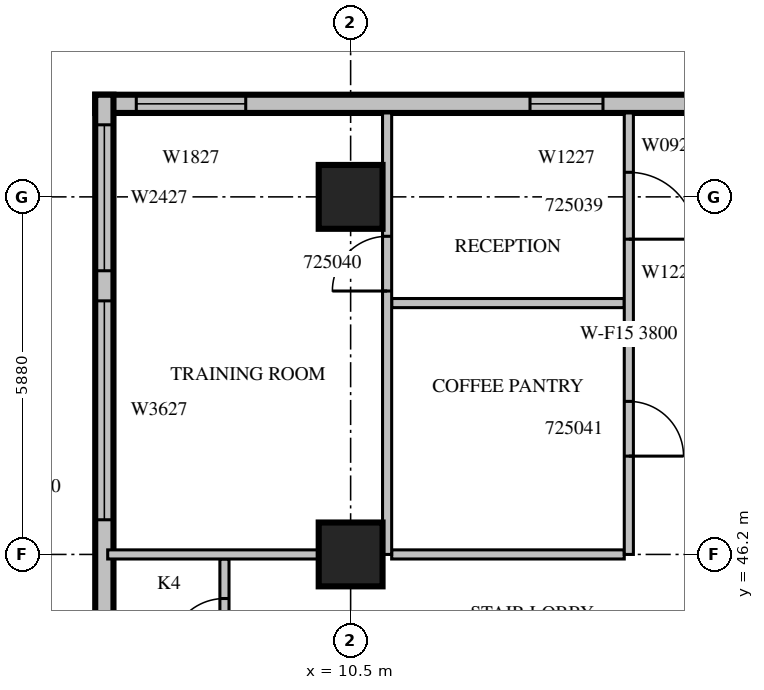
"""IFC4 building model, lengths in metres.
Left out: names, types, materials, properties, quantities, classifications, styles, units other than length and angle.
Written with IfcOpenShell. Run it as: python <this file> out.ifc"""

import sys

from ifc_helpers import new_model, si_unit, direction, frame, frame_2d, origin, origin_2d, place, context, subcontext, project, spatial, rectangle, extrude, source, transform, mapped, element, fill, save


model = new_model("IFC4")
c1 = context("Model", 3, precision=1e-05, world=origin(), true_north=direction((0.0, 1.0)))
c2 = subcontext(c1, "Body", "Model", "MODEL_VIEW")
j1 = project(units=[si_unit("LENGTHUNIT", "METRE"), si_unit("PLANEANGLEUNIT", "RADIAN")], contexts=[c1])
p1 = place(None, origin())
s1 = spatial("IfcSite", under=j1, at=p1, CompositionType="ELEMENT")
p2 = place(p1, origin())
s2 = spatial("IfcBuilding", under=s1, at=p2, CompositionType="ELEMENT")
p3 = place(p2, frame((0.0, 0.0, 116.1)))
s3 = spatial("IfcBuildingStorey", under=s2, at=p3, CompositionType="ELEMENT", Elevation=116.1)
m1 = source(origin(), c2, "Body", "SweptSolid", [
    extrude(rectangle(XDim=1.05, YDim=1.05, at=origin_2d()), origin(), (0.0, 0.0, 1.0), 4.2),
])
for number, where, z_axis, x_axis in (
    (1, (10.5, 46.2, 0.0), (0.0, 0.0, 1.0), (1.0, 0.0, 0.0)),
    (2, (10.5, 52.08, 0.0), (0.0, 0.0, 1.0), (1.0, 0.0, 0.0)),
):
    element("IfcColumn", number, at=place(p3, frame(where, z_axis=z_axis, x_axis=x_axis)), inside=s3, PredefinedType="COLUMN", context=c2, shape_type="MappedRepresentation", body=[
        mapped(m1, transform((0.0, 0.0, 0.0), scale=1.0)),
    ])
m2 = source(origin(), c2, "Body", "SweptSolid", [
    extrude(rectangle(XDim=10.5, YDim=0.3, at=frame_2d((5.25, 0.0))), origin(), (0.0, 0.0, 1.0), 3.8),
])
p4 = place(p3, frame((16.8, 53.61, 0.0), z_axis=(0.0, 0.0, 1.0), x_axis=(-1.0, 0.0, 0.0)))
e3 = element("IfcWall", 3, at=p4, inside=s3, PredefinedType="STANDARD", context=c2, shape_type="MappedRepresentation", body=[
    mapped(m2, transform((0.0, 0.0, 0.0), scale=1.0)),
])
m3 = source(origin(), c2, "Body", "SweptSolid", [
    extrude(rectangle(XDim=1.2, YDim=2.7, at=frame_2d((0.6, 1.35))), frame((0.0, 0.16, 0.0), z_axis=(0.0, -1.0, 0.0), x_axis=(1.0, 0.0, 0.0)), (0.0, 0.0, 1.0), 0.32),
])
p5 = place(p4, frame((2.15, 0.0, 0.6)))
e4 = element("IfcOpeningElement", 4, at=p5, cuts=e3, PredefinedType="OPENING", context=c2, shape_type="MappedRepresentation", body=[
    mapped(m3, transform((0.0, 0.0, 0.0), scale=1.0)),
])
m4 = source(origin(), c2, "Body", "SweptSolid", [
    extrude(rectangle(XDim=1.8, YDim=2.7, at=frame_2d((0.9, 1.35))), frame((0.0, 0.16, 0.0), z_axis=(0.0, -1.0, 0.0), x_axis=(1.0, 0.0, 0.0)), (0.0, 0.0, 1.0), 0.32),
])
p6 = place(p4, frame((8.025, 0.0, 0.6)))
e5 = element("IfcOpeningElement", 5, at=p6, cuts=e3, PredefinedType="OPENING", context=c2, shape_type="MappedRepresentation", body=[
    mapped(m4, transform((0.0, 0.0, 0.0), scale=1.0)),
])
m5 = source(origin(), c2, "Body", "SweptSolid", [
    extrude(rectangle(XDim=9.91, YDim=0.3, at=frame_2d((4.955, 0.0))), origin(), (0.0, 0.0, 1.0), 3.8),
])
p7 = place(p3, frame((6.45, 53.76, 0.0), z_axis=(0.0, 0.0, 1.0), x_axis=(0.0, -1.0, 0.0)))
e6 = element("IfcWall", 6, at=p7, inside=s3, PredefinedType="STANDARD", context=c2, shape_type="MappedRepresentation", body=[
    mapped(m5, transform((0.0, 0.0, 0.0), scale=1.0)),
])
m6 = source(origin(), c2, "Body", "SweptSolid", [
    extrude(rectangle(XDim=3.6, YDim=2.7, at=frame_2d((1.8, 1.35))), frame((0.0, 0.16, 0.0), z_axis=(0.0, -1.0, 0.0), x_axis=(1.0, 0.0, 0.0)), (0.0, 0.0, 1.0), 0.32),
])
p8 = place(p7, frame((3.39, 0.0, 0.6)))
e7 = element("IfcOpeningElement", 7, at=p8, cuts=e6, PredefinedType="OPENING", context=c2, shape_type="MappedRepresentation", body=[
    mapped(m6, transform((0.0, 0.0, 0.0), scale=1.0)),
])
m7 = source(origin(), c2, "Body", "SweptSolid", [
    extrude(rectangle(XDim=2.4, YDim=2.7, at=frame_2d((1.2, 1.35))), frame((0.0, 0.16, 0.0), z_axis=(0.0, -1.0, 0.0), x_axis=(1.0, 0.0, 0.0)), (0.0, 0.0, 1.0), 0.32),
])
p9 = place(p7, frame((0.495, 0.0, 0.6)))
e8 = element("IfcOpeningElement", 8, at=p9, cuts=e6, PredefinedType="OPENING", context=c2, shape_type="MappedRepresentation", body=[
    mapped(m7, transform((0.0, 0.0, 0.0), scale=1.0)),
])
m8 = source(origin(), c2, "Body", "SweptSolid", [
    extrude(rectangle(XDim=2.2, YDim=0.15, at=frame_2d((1.1, 0.0))), origin(), (0.0, 0.0, 1.0), 3.8),
])
p10 = place(p3, frame((8.425, 43.925, 0.0), z_axis=(0.0, 0.0, 1.0), x_axis=(0.0, 1.0, 0.0)))
e9 = element("IfcWall", 9, at=p10, inside=s3, PredefinedType="PARTITIONING", context=c2, shape_type="MappedRepresentation", body=[
    mapped(m8, transform((0.0, 0.0, 0.0), scale=1.0)),
])
m9 = source(origin(), c2, "Body", "SweptSolid", [
    extrude(rectangle(XDim=0.9, YDim=2.1, at=frame_2d((0.45, 1.05))), frame((0.0, 0.085, 0.0), z_axis=(0.0, -1.0, 0.0), x_axis=(1.0, 0.0, 0.0)), (0.0, 0.0, 1.0), 0.17),
])
p11 = place(p10, frame((0.65, 0.0, 0.0)))
e10 = element("IfcOpeningElement", 10, at=p11, cuts=e9, PredefinedType="OPENING", context=c2, shape_type="MappedRepresentation", body=[
    mapped(m9, transform((0.0, 0.0, 0.0), scale=1.0)),
])
m10 = source(origin(), c2, "Body", "SweptSolid", [
    extrude(rectangle(XDim=3.825, YDim=0.15, at=frame_2d((1.913, 0.0))), origin(), (0.0, 0.0, 1.0), 3.8),
])
p12 = place(p3, frame((15.0, 50.334, 0.0), z_axis=(0.0, 0.0, 1.0), x_axis=(-1.0, 0.0, 0.0)))
e11 = element("IfcWall", 11, at=p12, inside=s3, PredefinedType="PARTITIONING", context=c2, shape_type="MappedRepresentation", body=[
    mapped(m10, transform((0.0, 0.0, 0.0), scale=1.0)),
])
m11 = source(origin(), c2, "Body", "SweptSolid", [
    extrude(rectangle(XDim=3.471, YDim=0.15, at=frame_2d((1.736, 0.0))), origin(), (0.0, 0.0, 1.0), 3.8),
])
p13 = place(p3, frame((9.976, 46.2, 0.0), z_axis=(0.0, 0.0, 1.0), x_axis=(-1.0, 0.0, 0.0)))
e12 = element("IfcWall", 12, at=p13, inside=s3, PredefinedType="PARTITIONING", context=c2, shape_type="MappedRepresentation", body=[
    mapped(m11, transform((0.0, 0.0, 0.0), scale=1.0)),
])
p14 = place(p3, frame((15.0, 46.2, 0.0), z_axis=(0.0, 0.0, 1.0), x_axis=(-1.0, 0.0, 0.0)))
e13 = element("IfcWall", 13, at=p14, inside=s3, PredefinedType="PARTITIONING", context=c2, shape_type="MappedRepresentation", body=[
    mapped(m10, transform((0.0, 0.0, 0.0), scale=1.0)),
])
m12 = source(origin(), c2, "Body", "SweptSolid", [
    extrude(rectangle(XDim=7.26, YDim=0.15, at=frame_2d((3.63, 0.0))), origin(), (0.0, 0.0, 1.0), 3.8),
])
p15 = place(p3, frame((11.1, 46.2, 0.0), z_axis=(0.0, 0.0, 1.0), x_axis=(0.0, 1.0, 0.0)))
e14 = element("IfcWall", 14, at=p15, inside=s3, PredefinedType="PARTITIONING", context=c2, shape_type="MappedRepresentation", body=[
    mapped(m12, transform((0.0, 0.0, 0.0), scale=1.0)),
])
p16 = place(p15, frame((4.332, 0.0, 0.0)))
e15 = element("IfcOpeningElement", 15, at=p16, cuts=e14, PredefinedType="OPENING", context=c2, shape_type="MappedRepresentation", body=[
    mapped(m9, transform((0.0, 0.0, 0.0), scale=1.0)),
])
p17 = place(p3, frame((15.075, 46.2, 0.0), z_axis=(0.0, 0.0, 1.0), x_axis=(0.0, 1.0, 0.0)))
e16 = element("IfcWall", 16, at=p17, inside=s3, PredefinedType="PARTITIONING", context=c2, shape_type="MappedRepresentation", body=[
    mapped(m12, transform((0.0, 0.0, 0.0), scale=1.0)),
])
m13 = source(origin(), c2, "Body", "SweptSolid", [
    extrude(rectangle(XDim=1.1, YDim=2.1, at=frame_2d((0.55, 1.05))), frame((0.0, 0.085, 0.0), z_axis=(0.0, -1.0, 0.0), x_axis=(1.0, 0.0, 0.0)), (0.0, 0.0, 1.0), 0.17),
])
p18 = place(p17, frame((5.184, 0.0, 0.0)))
e17 = element("IfcOpeningElement", 17, at=p18, cuts=e16, PredefinedType="OPENING", context=c2, shape_type="MappedRepresentation", body=[
    mapped(m13, transform((0.0, 0.0, 0.0), scale=1.0)),
])
p19 = place(p17, frame((1.617, 0.0, 0.0)))
e18 = element("IfcOpeningElement", 18, at=p19, cuts=e16, PredefinedType="OPENING", context=c2, shape_type="MappedRepresentation", body=[
    mapped(m9, transform((0.0, 0.0, 0.0), scale=1.0)),
])
m14 = source(origin(), c2, "Body", "SweptSolid", [
    extrude(rectangle(XDim=1.2, YDim=2.7, at=frame_2d((0.6, 1.35))), frame((0.0, 0.03, 0.0), z_axis=(0.0, -1.0, 0.0), x_axis=(1.0, 0.0, 0.0)), (0.0, 0.0, 1.0), 0.06),
])
p20 = place(p5, origin())
e19 = element("IfcWindow", 19, at=p20, inside=s3, PartitioningType="SINGLE_PANEL", PredefinedType="WINDOW", context=c2, shape_type="MappedRepresentation", body=[
    mapped(m14, transform((0.0, 0.0, 0.0), scale=1.0)),
])
fill(e4, e19)
m15 = source(origin(), c2, "Body", "SweptSolid", [
    extrude(rectangle(XDim=1.8, YDim=2.7, at=frame_2d((0.9, 1.35))), frame((0.0, 0.03, 0.0), z_axis=(0.0, -1.0, 0.0), x_axis=(1.0, 0.0, 0.0)), (0.0, 0.0, 1.0), 0.06),
])
p21 = place(p6, origin())
e20 = element("IfcWindow", 20, at=p21, inside=s3, PartitioningType="SINGLE_PANEL", PredefinedType="WINDOW", context=c2, shape_type="MappedRepresentation", body=[
    mapped(m15, transform((0.0, 0.0, 0.0), scale=1.0)),
])
fill(e5, e20)
m16 = source(origin(), c2, "Body", "SweptSolid", [
    extrude(rectangle(XDim=3.6, YDim=2.7, at=frame_2d((1.8, 1.35))), frame((0.0, 0.03, 0.0), z_axis=(0.0, -1.0, 0.0), x_axis=(1.0, 0.0, 0.0)), (0.0, 0.0, 1.0), 0.06),
])
p22 = place(p8, origin())
e21 = element("IfcWindow", 21, at=p22, inside=s3, PartitioningType="SINGLE_PANEL", PredefinedType="WINDOW", context=c2, shape_type="MappedRepresentation", body=[
    mapped(m16, transform((0.0, 0.0, 0.0), scale=1.0)),
])
fill(e7, e21)
m17 = source(origin(), c2, "Body", "SweptSolid", [
    extrude(rectangle(XDim=2.4, YDim=2.7, at=frame_2d((1.2, 1.35))), frame((0.0, 0.03, 0.0), z_axis=(0.0, -1.0, 0.0), x_axis=(1.0, 0.0, 0.0)), (0.0, 0.0, 1.0), 0.06),
])
p23 = place(p9, origin())
e22 = element("IfcWindow", 22, at=p23, inside=s3, PartitioningType="SINGLE_PANEL", PredefinedType="WINDOW", context=c2, shape_type="MappedRepresentation", body=[
    mapped(m17, transform((0.0, 0.0, 0.0), scale=1.0)),
])
fill(e8, e22)
m18 = source(origin(), c2, "Body", "SweptSolid", [
    extrude(rectangle(XDim=0.9, YDim=2.1, at=frame_2d((0.45, 1.05))), frame((0.0, 0.025, 0.0), z_axis=(0.0, -1.0, 0.0), x_axis=(1.0, 0.0, 0.0)), (0.0, 0.0, 1.0), 0.05),
])
p24 = place(p11, origin())
e23 = element("IfcDoor", 23, at=p24, inside=s3, OperationType="SINGLE_SWING_LEFT", PredefinedType="DOOR", context=c2, shape_type="MappedRepresentation", body=[
    mapped(m18, transform((0.0, 0.0, 0.0), scale=1.0)),
])
fill(e10, e23)
m19 = source(origin(), c2, "Body", "SweptSolid", [
    extrude(rectangle(XDim=1.1, YDim=2.1, at=frame_2d((0.55, 1.05))), frame((0.0, 0.025, 0.0), z_axis=(0.0, -1.0, 0.0), x_axis=(1.0, 0.0, 0.0)), (0.0, 0.0, 1.0), 0.05),
])
p25 = place(p18, origin())
e24 = element("IfcDoor", 24, at=p25, inside=s3, OperationType="SINGLE_SWING_RIGHT", PredefinedType="DOOR", context=c2, shape_type="MappedRepresentation", body=[
    mapped(m19, transform((0.0, 0.0, 0.0), scale=1.0)),
])
fill(e17, e24)
p26 = place(p16, origin())
e25 = element("IfcDoor", 25, at=p26, inside=s3, OperationType="SINGLE_SWING_LEFT", PredefinedType="DOOR", context=c2, shape_type="MappedRepresentation", body=[
    mapped(m18, transform((0.0, 0.0, 0.0), scale=1.0)),
])
fill(e15, e25)
p27 = place(p19, origin())
e26 = element("IfcDoor", 26, at=p27, inside=s3, OperationType="SINGLE_SWING_RIGHT", PredefinedType="DOOR", context=c2, shape_type="MappedRepresentation", body=[
    mapped(m18, transform((0.0, 0.0, 0.0), scale=1.0)),
])
fill(e18, e26)
save(model, sys.argv[1])
